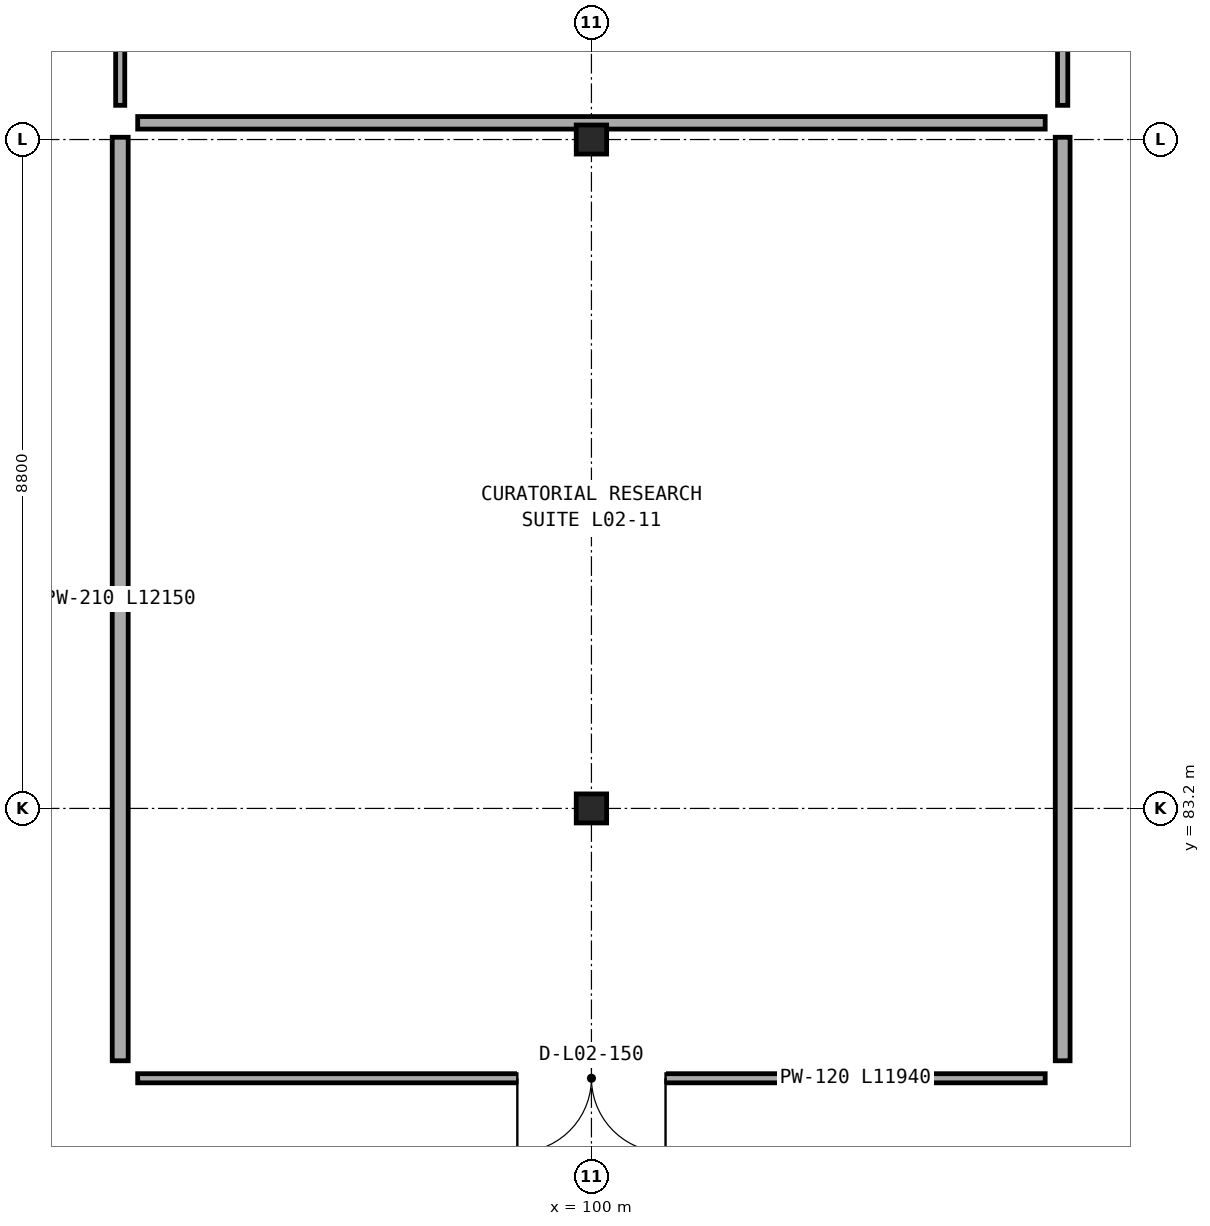
"""IFC4 building model, lengths in metres.
Left out: names, types, materials, properties, quantities, classifications, styles, units other than length and angle.
Written with IfcOpenShell. Run it as: python <this file> out.ifc"""

import sys

from ifc_helpers import new_model, si_unit, direction, frame, frame_2d, origin, origin_2d, place, context, subcontext, project, spatial, rectangle, i_section, extrude, element, fill, save


model = new_model("IFC4")
c1 = context("Model", 3, precision=1e-05, world=origin(), true_north=direction((0.0, 1.0)))
c2 = subcontext(c1, "Body", "Model", "MODEL_VIEW")
j1 = project(units=[si_unit("LENGTHUNIT", "METRE"), si_unit("PLANEANGLEUNIT", "RADIAN")], contexts=[c1])
p1 = place(None, origin())
s1 = spatial("IfcSite", under=j1, at=p1, CompositionType="ELEMENT")
p2 = place(p1, origin())
s2 = spatial("IfcBuilding", under=s1, at=p2, CompositionType="ELEMENT")
p3 = place(p2, frame((0.0, 0.0, 10.1)))
s3 = spatial("IfcBuildingStorey", under=s2, at=p3, CompositionType="ELEMENT", Elevation=10.1)
for number, where, z_axis, x_axis in (
    (1, (100.0, 83.2, 0.0), (0.0, 0.0, 1.0), (1.0, 0.0, 0.0)),
    (2, (100.0, 92.0, 0.0), (0.0, 0.0, 1.0), (1.0, 0.0, 0.0)),
):
    element("IfcColumn", number, at=place(p3, frame(where, z_axis=z_axis, x_axis=x_axis)), inside=s3, PredefinedType="COLUMN", context=c2, shape_type="SweptSolid", body=[
        extrude(i_section(OverallWidth=0.4, OverallDepth=0.382, WebThickness=0.025, FlangeThickness=0.036, at=origin_2d()), origin(), (0.0, 0.0, 1.0), 4.5),
    ])
p4 = place(p3, frame((106.2, 107.64, 0.0), z_axis=(0.0, 0.0, 1.0), x_axis=(0.0, -1.0, 0.0)))
e3 = element("IfcWall", 3, at=p4, inside=s3, PredefinedType="PARTITIONING", context=c2, shape_type="SweptSolid", body=[
    extrude(rectangle(XDim=15.19, YDim=0.135, at=frame_2d((7.595, 0.0))), origin(), (0.0, 0.0, 1.0), 3.613),
])
p5 = place(p4, frame((6.525, 0.0, 0.0)))
e4 = element("IfcOpeningElement", 4, at=p5, cuts=e3, PredefinedType="OPENING", context=c2, shape_type="SweptSolid", body=[
    extrude(rectangle(XDim=2.14, YDim=2.46, at=frame_2d((1.07, 1.23))), frame((0.0, 0.078, 0.0), z_axis=(0.0, -1.0, 0.0), x_axis=(1.0, 0.0, 0.0)), (0.0, 0.0, 1.0), 0.155),
])
p6 = place(p3, frame((93.8, 92.45, 0.0), z_axis=(0.0, 0.0, 1.0), x_axis=(0.0, 1.0, 0.0)))
e5 = element("IfcWall", 5, at=p6, inside=s3, PredefinedType="PARTITIONING", context=c2, shape_type="SweptSolid", body=[
    extrude(rectangle(XDim=15.19, YDim=0.12, at=frame_2d((7.595, 0.0))), origin(), (0.0, 0.0, 1.0), 3.613),
])
p7 = place(p3, frame((105.97, 79.65, 0.0), z_axis=(0.0, 0.0, 1.0), x_axis=(-1.0, 0.0, 0.0)))
e6 = element("IfcWall", 6, at=p7, inside=s3, PredefinedType="PARTITIONING", context=c2, shape_type="SweptSolid", body=[
    extrude(rectangle(XDim=11.94, YDim=0.12, at=frame_2d((5.97, 0.0))), origin(), (0.0, 0.0, 1.0), 4.13),
])
p8 = place(p7, frame((4.995, 0.0, 0.0)))
e7 = element("IfcOpeningElement", 7, at=p8, cuts=e6, PredefinedType="OPENING", context=c2, shape_type="SweptSolid", body=[
    extrude(rectangle(XDim=1.95, YDim=2.58, at=frame_2d((0.975, 1.29))), frame((0.0, 0.07, 0.0), z_axis=(0.0, -1.0, 0.0), x_axis=(1.0, 0.0, 0.0)), (0.0, 0.0, 1.0), 0.14),
])
p9 = place(p3, frame((93.8, 79.88, 0.0), z_axis=(0.0, 0.0, 1.0), x_axis=(0.0, 1.0, 0.0)))
e8 = element("IfcWall", 8, at=p9, inside=s3, PredefinedType="PARTITIONING", context=c2, shape_type="SweptSolid", body=[
    extrude(rectangle(XDim=12.15, YDim=0.21, at=frame_2d((6.075, 0.0))), origin(), (0.0, 0.0, 1.0), 3.613),
])
p10 = place(p3, frame((106.2, 92.03, 0.0), z_axis=(0.0, 0.0, 1.0), x_axis=(0.0, -1.0, 0.0)))
e9 = element("IfcWall", 9, at=p10, inside=s3, PredefinedType="PARTITIONING", context=c2, shape_type="SweptSolid", body=[
    extrude(rectangle(XDim=12.15, YDim=0.195, at=frame_2d((6.075, 0.0))), origin(), (0.0, 0.0, 1.0), 3.613),
])
p11 = place(p3, frame((105.97, 92.22, 0.0), z_axis=(0.0, 0.0, 1.0), x_axis=(-1.0, 0.0, 0.0)))
e10 = element("IfcWall", 10, at=p11, inside=s3, PredefinedType="PARTITIONING", context=c2, shape_type="SweptSolid", body=[
    extrude(rectangle(XDim=11.94, YDim=0.165, at=frame_2d((5.97, 0.0))), origin(), (0.0, 0.0, 1.0), 3.613),
])
p12 = place(p8, origin())
e11 = element("IfcDoor", 11, at=p12, inside=s3, OperationType="DOUBLE_DOOR_SINGLE_SWING", PredefinedType="DOOR", context=c2, shape_type="SweptSolid", body=[
    extrude(rectangle(XDim=1.95, YDim=2.58, at=frame_2d((0.975, 1.29))), frame((0.0, 0.025, 0.0), z_axis=(0.0, -1.0, 0.0), x_axis=(1.0, 0.0, 0.0)), (0.0, 0.0, 1.0), 0.05),
])
fill(e7, e11)
save(model, sys.argv[1])
